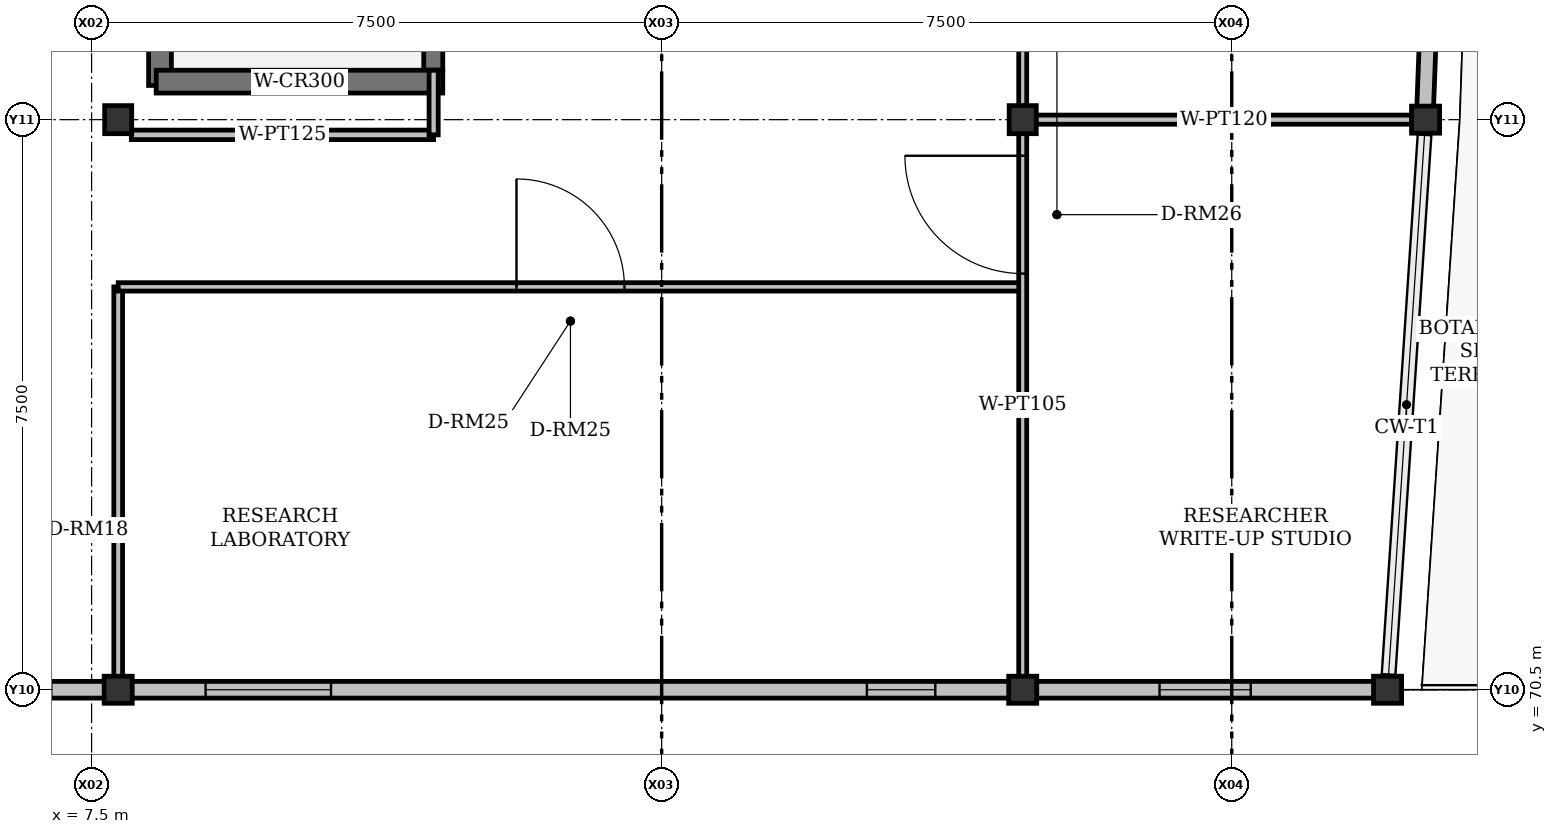
"""IFC4 building model, lengths in metres.
Left out: names, types, materials, properties, quantities, classifications, styles, units other than length and angle.
Written with IfcOpenShell. Run it as: python <this file> out.ifc"""

import sys

from ifc_helpers import new_model, si_unit, direction, frame, frame_2d, origin, origin_2d, place, context, subcontext, project, spatial, rectangle, i_section, extrude, element, fill, save


model = new_model("IFC4")
c1 = context("Model", 3, precision=1e-05, world=origin(), true_north=direction((0.0, 1.0)))
c2 = subcontext(c1, "Body", "Model", "MODEL_VIEW")
j1 = project(units=[si_unit("LENGTHUNIT", "METRE"), si_unit("PLANEANGLEUNIT", "RADIAN")], contexts=[c1])
p1 = place(None, origin())
s1 = spatial("IfcSite", under=j1, at=p1, CompositionType="ELEMENT")
p2 = place(p1, origin())
s2 = spatial("IfcBuilding", under=s1, at=p2, CompositionType="ELEMENT")
p3 = place(p2, frame((0.0, 0.0, 47.7)))
s3 = spatial("IfcBuildingStorey", under=s2, at=p3, CompositionType="ELEMENT", Elevation=47.7)
for number, where, z_axis, x_axis in (
    (1, (7.85, 70.5, 0.0), (0.0, 0.0, 1.0), (1.0, 0.0, 0.0)),
    (2, (19.75, 70.5, 0.0), (0.0, 0.0, 1.0), (1.0, 0.0, 0.0)),
    (3, (24.55, 70.5, 0.0), (0.0, 0.0, 1.0), (1.0, 0.0, 0.0)),
    (4, (7.85, 78.0, 0.0), (0.0, 0.0, 1.0), (0.0, 1.0, 0.0)),
    (5, (19.75, 78.0, 0.0), (0.0, 0.0, 1.0), (0.0, 1.0, 0.0)),
    (6, (25.05, 78.0, 0.0), (0.0, 0.0, 1.0), (1.0, 0.0, 0.0)),
):
    element("IfcColumn", number, at=place(p3, frame(where, z_axis=z_axis, x_axis=x_axis)), inside=s3, PredefinedType="COLUMN", context=c2, shape_type="SweptSolid", body=[
        extrude(i_section(OverallWidth=0.369, OverallDepth=0.356, WebThickness=0.011, FlangeThickness=0.018, FilletRadius=0.015, at=origin_2d()), origin(), (0.0, 0.0, 1.0), 4.2),
    ])
p4 = place(p3, frame((7.85, 70.5, 0.0), z_axis=(0.0, 0.0, 1.0), x_axis=(-1.0, 0.0, 0.0)))
e7 = element("IfcWall", 7, at=p4, inside=s3, PredefinedType="SOLIDWALL", context=c2, shape_type="SweptSolid", body=[
    extrude(rectangle(XDim=7.3, YDim=0.22, at=frame_2d((3.65, 0.0))), origin(), (0.0, 0.0, 1.0), 3.577),
])
p5 = place(p4, frame((0.88, 0.0, 0.92)))
e8 = element("IfcOpeningElement", 8, at=p5, cuts=e7, PredefinedType="OPENING", context=c2, shape_type="SweptSolid", body=[
    extrude(rectangle(XDim=1.05, YDim=1.3, at=frame_2d((0.525, 0.65))), frame((0.0, 0.11, 0.0), z_axis=(0.0, -1.0, 0.0), x_axis=(1.0, 0.0, 0.0)), (0.0, 0.0, 1.0), 0.22),
])
p6 = place(p4, frame((3.745, 0.0, 0.92)))
e9 = element("IfcOpeningElement", 9, at=p6, cuts=e7, PredefinedType="OPENING", context=c2, shape_type="SweptSolid", body=[
    extrude(rectangle(XDim=1.6, YDim=1.35, at=frame_2d((0.8, 0.675))), frame((0.0, 0.11, 0.0), z_axis=(0.0, -1.0, 0.0), x_axis=(1.0, 0.0, 0.0)), (0.0, 0.0, 1.0), 0.22),
])
p7 = place(p3, frame((19.75, 70.5, 0.0), z_axis=(0.0, 0.0, 1.0), x_axis=(-1.0, 0.0, 0.0)))
e10 = element("IfcWall", 10, at=p7, inside=s3, PredefinedType="SOLIDWALL", context=c2, shape_type="SweptSolid", body=[
    extrude(rectangle(XDim=11.9, YDim=0.22, at=frame_2d((5.95, 0.0))), origin(), (0.0, 0.0, 1.0), 3.577),
])
p8 = place(p7, frame((1.15, 0.0, 0.92)))
e11 = element("IfcOpeningElement", 11, at=p8, cuts=e10, PredefinedType="OPENING", context=c2, shape_type="SweptSolid", body=[
    extrude(rectangle(XDim=0.9, YDim=1.3, at=frame_2d((0.45, 0.65))), frame((0.0, 0.11, 0.0), z_axis=(0.0, -1.0, 0.0), x_axis=(1.0, 0.0, 0.0)), (0.0, 0.0, 1.0), 0.22),
])
p9 = place(p7, frame((9.1, 0.0, 0.92)))
e12 = element("IfcOpeningElement", 12, at=p9, cuts=e10, PredefinedType="OPENING", context=c2, shape_type="SweptSolid", body=[
    extrude(rectangle(XDim=1.65, YDim=1.4, at=frame_2d((0.825, 0.7))), frame((0.0, 0.11, 0.0), z_axis=(0.0, -1.0, 0.0), x_axis=(1.0, 0.0, 0.0)), (0.0, 0.0, 1.0), 0.22),
])
p10 = place(p3, frame((24.55, 70.5, 0.0), z_axis=(0.0, 0.0, 1.0), x_axis=(-1.0, 0.0, 0.0)))
e13 = element("IfcWall", 13, at=p10, inside=s3, PredefinedType="SOLIDWALL", context=c2, shape_type="SweptSolid", body=[
    extrude(rectangle(XDim=4.8, YDim=0.22, at=frame_2d((2.4, 0.0))), origin(), (0.0, 0.0, 1.0), 3.577),
])
p11 = place(p10, frame((1.8, 0.0, 0.92)))
e14 = element("IfcOpeningElement", 14, at=p11, cuts=e13, PredefinedType="OPENING", context=c2, shape_type="SweptSolid", body=[
    extrude(rectangle(XDim=1.2, YDim=1.4, at=frame_2d((0.6, 0.7))), frame((0.0, 0.11, 0.0), z_axis=(0.0, -1.0, 0.0), x_axis=(1.0, 0.0, 0.0)), (0.0, 0.0, 1.0), 0.22),
])
p12 = place(p3, frame((25.311, 85.2, 0.0), z_axis=(0.0, 0.0, 1.0), x_axis=(-0.037818828921, -0.9992846122, 0.0)))
e15 = element("IfcWall", 15, at=p12, inside=s3, PredefinedType="SOLIDWALL", context=c2, shape_type="SweptSolid", body=[
    extrude(rectangle(XDim=7.204, YDim=0.22, at=frame_2d((3.602, 0.0))), origin(), (0.0, 0.0, 1.0), 3.577),
])
p13 = place(p12, frame((2.7, 0.0, 0.0)))
e16 = element("IfcOpeningElement", 16, at=p13, cuts=e15, PredefinedType="OPENING", context=c2, shape_type="SweptSolid", body=[
    extrude(rectangle(XDim=1.4, YDim=2.2, at=frame_2d((0.7, 1.1))), frame((0.0, 0.11, 0.0), z_axis=(0.0, -1.0, 0.0), x_axis=(1.0, 0.0, 0.0)), (0.0, 0.0, 1.0), 0.22),
])
p14 = place(p3, frame((8.4, 78.45, 0.0), z_axis=(0.0, 0.0, 1.0), x_axis=(0.0, 1.0, 0.0)))
e17 = element("IfcWall", 17, at=p14, inside=s3, PredefinedType="SHEAR", context=c2, shape_type="SweptSolid", body=[
    extrude(rectangle(XDim=8.175, YDim=0.3, at=frame_2d((4.087, 0.0))), origin(), (0.0, 0.0, 1.0), 4.2),
])
p15 = place(p3, frame((11.995, 78.65, 0.0), z_axis=(0.0, 0.0, 1.0), x_axis=(0.0, 1.0, 0.0)))
e18 = element("IfcWall", 18, at=p15, inside=s3, PredefinedType="SHEAR", context=c2, shape_type="SweptSolid", body=[
    extrude(rectangle(XDim=7.85, YDim=0.25, at=frame_2d((3.925, 0.0))), origin(), (0.0, 0.0, 1.0), 4.2),
])
p16 = place(p3, frame((8.35, 78.5, 0.0), z_axis=(0.0, 0.0, 1.0), x_axis=(1.0, 0.0, 0.0)))
e19 = element("IfcWall", 19, at=p16, inside=s3, PredefinedType="SHEAR", context=c2, shape_type="SweptSolid", body=[
    extrude(rectangle(XDim=3.77, YDim=0.3, at=frame_2d((1.885, 0.0))), origin(), (0.0, 0.0, 1.0), 4.2),
])
p17 = place(p3, frame((8.023, 77.8, 0.0), z_axis=(0.0, 0.0, 1.0), x_axis=(1.0, 0.0, 0.0)))
e20 = element("IfcWall", 20, at=p17, inside=s3, PredefinedType="PARTITIONING", context=c2, shape_type="SweptSolid", body=[
    extrude(rectangle(XDim=3.977, YDim=0.125, at=frame_2d((1.989, 0.0))), origin(), (0.0, 0.0, 1.0), 3.451),
])
p18 = place(p3, frame((12.0, 77.8, 0.0), z_axis=(0.0, 0.0, 1.0), x_axis=(0.0, 1.0, 0.0)))
e21 = element("IfcWall", 21, at=p18, inside=s3, PredefinedType="PARTITIONING", context=c2, shape_type="SweptSolid", body=[
    extrude(rectangle(XDim=0.85, YDim=0.12, at=frame_2d((0.425, 0.0))), origin(), (0.0, 0.0, 1.0), 3.451),
])
p19 = place(p3, frame((19.75, 78.179, 0.0), z_axis=(0.0, 0.0, 1.0), x_axis=(0.0, 1.0, 0.0)))
e22 = element("IfcWall", 22, at=p19, inside=s3, PredefinedType="PARTITIONING", context=c2, shape_type="SweptSolid", body=[
    extrude(rectangle(XDim=6.848, YDim=0.105, at=frame_2d((3.424, 0.0))), origin(), (0.0, 0.0, 1.0), 3.527),
])
p20 = place(p19, frame((2.781, 0.0, 0.0)))
e23 = element("IfcOpeningElement", 23, at=p20, cuts=e22, PredefinedType="OPENING", context=c2, shape_type="SweptSolid", body=[
    extrude(rectangle(XDim=1.28, YDim=2.25, at=frame_2d((0.64, 1.125))), frame((0.0, 0.052, 0.0), z_axis=(0.0, -1.0, 0.0), x_axis=(1.0, 0.0, 0.0)), (0.0, 0.0, 1.0), 0.105),
])
p21 = place(p3, frame((24.871, 78.0, 0.0), z_axis=(0.0, 0.0, 1.0), x_axis=(-1.0, 0.0, 0.0)))
e24 = element("IfcWall", 24, at=p21, inside=s3, PredefinedType="PARTITIONING", context=c2, shape_type="SweptSolid", body=[
    extrude(rectangle(XDim=4.948, YDim=0.12, at=frame_2d((2.474, 0.0))), origin(), (0.0, 0.0, 1.0), 3.451),
])
p22 = place(p3, frame((7.85, 70.673, 0.0), z_axis=(0.0, 0.0, 1.0), x_axis=(0.0, 1.0, 0.0)))
e25 = element("IfcWall", 25, at=p22, inside=s3, PredefinedType="PARTITIONING", context=c2, shape_type="SweptSolid", body=[
    extrude(rectangle(XDim=5.127, YDim=0.115, at=frame_2d((2.563, 0.0))), origin(), (0.0, 0.0, 1.0), 3.527),
])
p23 = place(p3, frame((7.85, 75.8, 0.0), z_axis=(0.0, 0.0, 1.0), x_axis=(1.0, 0.0, 0.0)))
e26 = element("IfcWall", 26, at=p23, inside=s3, PredefinedType="PARTITIONING", context=c2, shape_type="SweptSolid", body=[
    extrude(rectangle(XDim=11.9, YDim=0.11, at=frame_2d((5.95, 0.0))), origin(), (0.0, 0.0, 1.0), 3.527),
])
p24 = place(p23, frame((5.24, 0.0, 0.0)))
e27 = element("IfcOpeningElement", 27, at=p24, cuts=e26, PredefinedType="OPENING", context=c2, shape_type="SweptSolid", body=[
    extrude(rectangle(XDim=1.42, YDim=2.3, at=frame_2d((0.71, 1.15))), frame((0.0, 0.055, 0.0), z_axis=(0.0, -1.0, 0.0), x_axis=(1.0, 0.0, 0.0)), (0.0, 0.0, 1.0), 0.11),
])
p25 = place(p3, frame((19.75, 70.673, 0.0), z_axis=(0.0, 0.0, 1.0), x_axis=(0.0, 1.0, 0.0)))
e28 = element("IfcWall", 28, at=p25, inside=s3, PredefinedType="PARTITIONING", context=c2, shape_type="SweptSolid", body=[
    extrude(rectangle(XDim=7.147, YDim=0.105, at=frame_2d((3.574, 0.0))), origin(), (0.0, 0.0, 1.0), 3.527),
])
p26 = place(p25, frame((5.302, 0.0, 0.0)))
e29 = element("IfcOpeningElement", 29, at=p26, cuts=e28, PredefinedType="OPENING", context=c2, shape_type="SweptSolid", body=[
    extrude(rectangle(XDim=1.55, YDim=2.3, at=frame_2d((0.775, 1.15))), frame((0.0, 0.052, 0.0), z_axis=(0.0, -1.0, 0.0), x_axis=(1.0, 0.0, 0.0)), (0.0, 0.0, 1.0), 0.105),
])
p27 = place(p8, origin())
e30 = element("IfcWindow", 30, at=p27, inside=s3, PartitioningType="SINGLE_PANEL", PredefinedType="WINDOW", context=c2, shape_type="SweptSolid", body=[
    extrude(rectangle(XDim=0.9, YDim=1.3, at=frame_2d((0.45, 0.65))), frame((0.0, 0.03, 0.0), z_axis=(0.0, -1.0, 0.0), x_axis=(1.0, 0.0, 0.0)), (0.0, 0.0, 1.0), 0.06),
])
fill(e11, e30)
p28 = place(p9, origin())
e31 = element("IfcWindow", 31, at=p28, inside=s3, PartitioningType="DOUBLE_PANEL_VERTICAL", PredefinedType="WINDOW", context=c2, shape_type="SweptSolid", body=[
    extrude(rectangle(XDim=1.65, YDim=1.4, at=frame_2d((0.825, 0.7))), frame((0.0, 0.03, 0.0), z_axis=(0.0, -1.0, 0.0), x_axis=(1.0, 0.0, 0.0)), (0.0, 0.0, 1.0), 0.06),
])
fill(e12, e31)
p29 = place(p11, origin())
e32 = element("IfcWindow", 32, at=p29, inside=s3, PartitioningType="SINGLE_PANEL", PredefinedType="WINDOW", context=c2, shape_type="SweptSolid", body=[
    extrude(rectangle(XDim=1.2, YDim=1.4, at=frame_2d((0.6, 0.7))), frame((0.0, 0.03, 0.0), z_axis=(0.0, -1.0, 0.0), x_axis=(1.0, 0.0, 0.0)), (0.0, 0.0, 1.0), 0.06),
])
fill(e14, e32)
p30 = place(p24, origin())
e33 = element("IfcDoor", 33, at=p30, inside=s3, OperationType="SINGLE_SWING_LEFT", PredefinedType="DOOR", context=c2, shape_type="SweptSolid", body=[
    extrude(rectangle(XDim=1.42, YDim=2.3, at=frame_2d((0.71, 1.15))), frame((0.0, 0.025, 0.0), z_axis=(0.0, -1.0, 0.0), x_axis=(1.0, 0.0, 0.0)), (0.0, 0.0, 1.0), 0.05),
])
fill(e27, e33)
p31 = place(p26, origin())
e34 = element("IfcDoor", 34, at=p31, inside=s3, OperationType="SINGLE_SWING_RIGHT", PredefinedType="DOOR", context=c2, shape_type="SweptSolid", body=[
    extrude(rectangle(XDim=1.55, YDim=2.3, at=frame_2d((0.775, 1.15))), frame((0.0, 0.025, 0.0), z_axis=(0.0, -1.0, 0.0), x_axis=(1.0, 0.0, 0.0)), (0.0, 0.0, 1.0), 0.05),
])
fill(e29, e34)
save(model, sys.argv[1])
